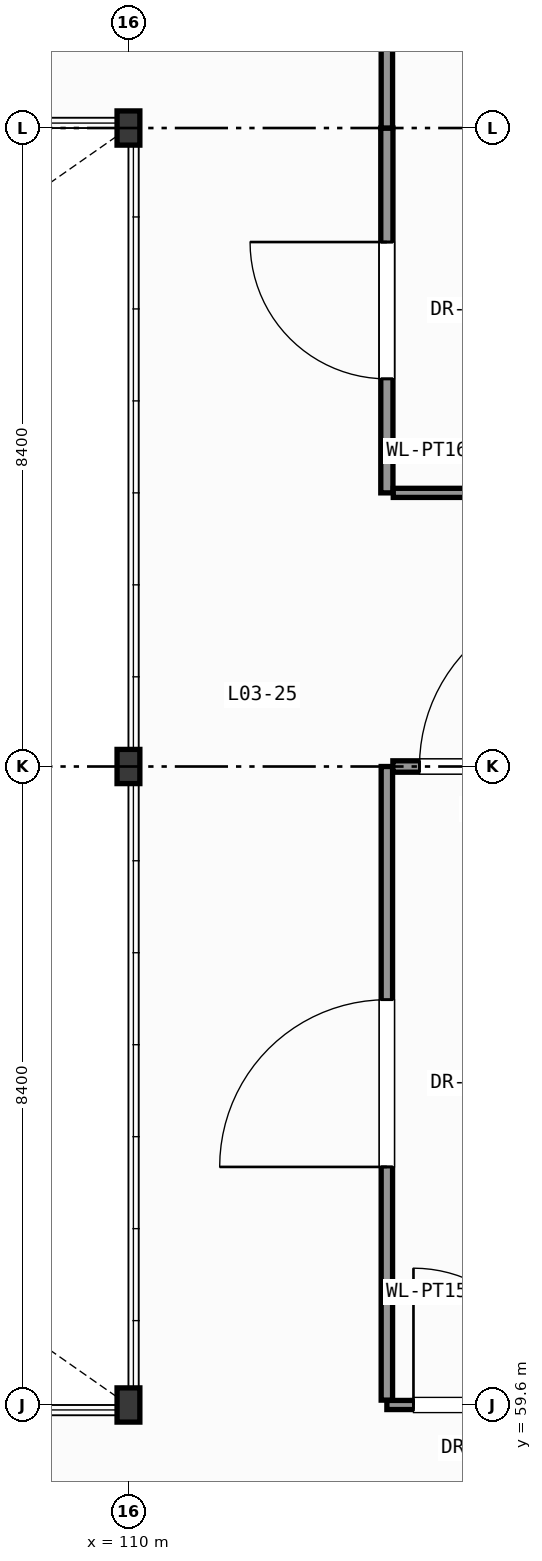
"""IFC4 building model, lengths in metres.
Left out: names, types, materials, properties, quantities, classifications, styles, units other than length and angle.
Written with IfcOpenShell. Run it as: python <this file> out.ifc"""

import sys

from ifc_helpers import new_model, si_unit, direction, frame, frame_2d, origin, origin_2d, place, context, subcontext, project, spatial, rectangle, i_section, extrude, element, fill, save


model = new_model("IFC4")
c1 = context("Model", 3, precision=1e-05, world=origin(), true_north=direction((0.0, 1.0)))
c2 = subcontext(c1, "Body", "Model", "MODEL_VIEW")
j1 = project(units=[si_unit("LENGTHUNIT", "METRE"), si_unit("PLANEANGLEUNIT", "RADIAN")], contexts=[c1])
p1 = place(None, origin())
s1 = spatial("IfcSite", under=j1, at=p1, CompositionType="ELEMENT")
p2 = place(p1, origin())
s2 = spatial("IfcBuilding", under=s1, at=p2, CompositionType="ELEMENT")
p3 = place(p2, frame((0.0, 0.0, 13.2)))
s3 = spatial("IfcBuildingStorey", under=s2, at=p3, CompositionType="ELEMENT", Elevation=13.2)
for number, where, z_axis, x_axis in (
    (1, (110.0, 59.6, 0.0), (0.0, 0.0, 1.0), (1.0, 0.0, 0.0)),
    (2, (110.0, 68.0, 0.0), (0.0, 0.0, 1.0), (1.0, 0.0, 0.0)),
    (3, (110.0, 76.4, 0.0), (0.0, 0.0, 1.0), (1.0, 0.0, 0.0)),
):
    element("IfcColumn", number, at=place(p3, frame(where, z_axis=z_axis, x_axis=x_axis)), inside=s3, PredefinedType="COLUMN", context=c2, shape_type="SweptSolid", body=[
        extrude(i_section(OverallWidth=0.3, OverallDepth=0.45, WebThickness=0.014, FlangeThickness=0.026, FilletRadius=0.027, at=origin_2d()), origin(), (0.0, 0.0, 1.0), 4.8),
    ])
p4 = place(p3, frame((113.4, 59.6, 0.0), z_axis=(0.0, 0.0, 1.0), x_axis=(1.0, 0.0, 0.0)))
e4 = element("IfcWall", 4, at=p4, inside=s3, PredefinedType="PARTITIONING", context=c2, shape_type="SweptSolid", body=[
    extrude(rectangle(XDim=5.2, YDim=0.12, at=frame_2d((2.6, 0.0))), origin(), (0.0, 0.0, 1.0), 4.155),
])
p5 = place(p4, frame((0.35, 0.0, 0.0)))
e5 = element("IfcOpeningElement", 5, at=p5, cuts=e4, PredefinedType="OPENING", context=c2, shape_type="SweptSolid", body=[
    extrude(rectangle(XDim=1.8, YDim=2.4, at=frame_2d((0.9, 1.2))), frame((0.0, 0.07, 0.0), z_axis=(0.0, -1.0, 0.0), x_axis=(1.0, 0.0, 0.0)), (0.0, 0.0, 1.0), 0.14),
])
p6 = place(p3, frame((113.4, 71.6, 0.0), z_axis=(0.0, 0.0, 1.0), x_axis=(0.0, 1.0, 0.0)))
e6 = element("IfcWall", 6, at=p6, inside=s3, PredefinedType="PARTITIONING", context=c2, shape_type="SweptSolid", body=[
    extrude(rectangle(XDim=4.8, YDim=0.16, at=frame_2d((2.4, 0.0))), origin(), (0.0, 0.0, 1.0), 4.56),
])
p7 = place(p6, frame((1.5, 0.0, 0.0)))
e7 = element("IfcOpeningElement", 7, at=p7, cuts=e6, PredefinedType="OPENING", context=c2, shape_type="SweptSolid", body=[
    extrude(rectangle(XDim=1.8, YDim=2.4, at=frame_2d((0.9, 1.2))), frame((0.0, 0.09, 0.0), z_axis=(0.0, -1.0, 0.0), x_axis=(1.0, 0.0, 0.0)), (0.0, 0.0, 1.0), 0.18),
])
p8 = place(p3, frame((113.4, 59.664, 0.0), z_axis=(0.0, 0.0, 1.0), x_axis=(0.0, 1.0, 0.0)))
e8 = element("IfcWall", 8, at=p8, inside=s3, PredefinedType="PARTITIONING", context=c2, shape_type="SweptSolid", body=[
    extrude(rectangle(XDim=8.336, YDim=0.15, at=frame_2d((4.168, 0.0))), origin(), (0.0, 0.0, 1.0), 4.56),
])
p9 = place(p8, frame((3.068, 0.0, 0.0)))
e9 = element("IfcOpeningElement", 9, at=p9, cuts=e8, PredefinedType="OPENING", context=c2, shape_type="SweptSolid", body=[
    extrude(rectangle(XDim=2.2, YDim=2.6, at=frame_2d((1.1, 1.3))), frame((0.0, 0.085, 0.0), z_axis=(0.0, -1.0, 0.0), x_axis=(1.0, 0.0, 0.0)), (0.0, 0.0, 1.0), 0.17),
])
p10 = place(p3, frame((113.4, 76.4, 0.0), z_axis=(0.0, 0.0, 1.0), x_axis=(0.0, 1.0, 0.0)))
e10 = element("IfcWall", 10, at=p10, inside=s3, PredefinedType="PARTITIONING", context=c2, shape_type="SweptSolid", body=[
    extrude(rectangle(XDim=3.336, YDim=0.15, at=frame_2d((1.668, 0.0))), origin(), (0.0, 0.0, 1.0), 4.56),
])
p11 = place(p10, frame((1.168, 0.0, 0.0)))
e11 = element("IfcOpeningElement", 11, at=p11, cuts=e10, PredefinedType="OPENING", context=c2, shape_type="SweptSolid", body=[
    extrude(rectangle(XDim=1.0, YDim=2.15, at=frame_2d((0.5, 1.075))), frame((0.0, 0.085, 0.0), z_axis=(0.0, -1.0, 0.0), x_axis=(1.0, 0.0, 0.0)), (0.0, 0.0, 1.0), 0.17),
])
p12 = place(p3, frame((113.484, 71.6, 0.0), z_axis=(0.0, 0.0, 1.0), x_axis=(1.0, 0.0, 0.0)))
e12 = element("IfcWall", 12, at=p12, inside=s3, PredefinedType="PARTITIONING", context=c2, shape_type="SweptSolid", body=[
    extrude(rectangle(XDim=12.516, YDim=0.12, at=frame_2d((6.258, 0.0))), origin(), (0.0, 0.0, 1.0), 4.56),
])
p13 = place(p12, frame((5.158, 0.0, 0.0)))
e13 = element("IfcOpeningElement", 13, at=p13, cuts=e12, PredefinedType="OPENING", context=c2, shape_type="SweptSolid", body=[
    extrude(rectangle(XDim=2.2, YDim=2.6, at=frame_2d((1.1, 1.3))), frame((0.0, 0.07, 0.0), z_axis=(0.0, -1.0, 0.0), x_axis=(1.0, 0.0, 0.0)), (0.0, 0.0, 1.0), 0.14),
])
p14 = place(p3, frame((113.479, 68.0, 0.0), z_axis=(0.0, 0.0, 1.0), x_axis=(1.0, 0.0, 0.0)))
e14 = element("IfcWall", 14, at=p14, inside=s3, PredefinedType="PARTITIONING", context=c2, shape_type="SweptSolid", body=[
    extrude(rectangle(XDim=12.342, YDim=0.15, at=frame_2d((6.171, 0.0))), origin(), (0.0, 0.0, 1.0), 4.095),
])
p15 = place(p14, frame((0.35, 0.0, 0.0)))
e15 = element("IfcOpeningElement", 15, at=p15, cuts=e14, PredefinedType="OPENING", context=c2, shape_type="SweptSolid", body=[
    extrude(rectangle(XDim=2.2, YDim=2.6, at=frame_2d((1.1, 1.3))), frame((0.0, 0.085, 0.0), z_axis=(0.0, -1.0, 0.0), x_axis=(1.0, 0.0, 0.0)), (0.0, 0.0, 1.0), 0.17),
])
p16 = place(p5, origin())
e16 = element("IfcDoor", 16, at=p16, inside=s3, OperationType="SINGLE_SWING_LEFT", PredefinedType="DOOR", context=c2, shape_type="SweptSolid", body=[
    extrude(rectangle(XDim=1.8, YDim=2.4, at=frame_2d((0.9, 1.2))), frame((0.0, 0.025, 0.0), z_axis=(0.0, -1.0, 0.0), x_axis=(1.0, 0.0, 0.0)), (0.0, 0.0, 1.0), 0.05),
])
fill(e5, e16)
p17 = place(p7, origin())
e17 = element("IfcDoor", 17, at=p17, inside=s3, OperationType="SINGLE_SWING_RIGHT", PredefinedType="DOOR", context=c2, shape_type="SweptSolid", body=[
    extrude(rectangle(XDim=1.8, YDim=2.4, at=frame_2d((0.9, 1.2))), frame((0.0, 0.025, 0.0), z_axis=(0.0, -1.0, 0.0), x_axis=(1.0, 0.0, 0.0)), (0.0, 0.0, 1.0), 0.05),
])
fill(e7, e17)
p18 = place(p9, origin())
e18 = element("IfcDoor", 18, at=p18, inside=s3, OperationType="SINGLE_SWING_LEFT", PredefinedType="DOOR", context=c2, shape_type="SweptSolid", body=[
    extrude(rectangle(XDim=2.2, YDim=2.6, at=frame_2d((1.1, 1.3))), frame((0.0, 0.025, 0.0), z_axis=(0.0, -1.0, 0.0), x_axis=(1.0, 0.0, 0.0)), (0.0, 0.0, 1.0), 0.05),
])
fill(e9, e18)
p19 = place(p15, origin())
e19 = element("IfcDoor", 19, at=p19, inside=s3, OperationType="SINGLE_SWING_RIGHT", PredefinedType="DOOR", context=c2, shape_type="SweptSolid", body=[
    extrude(rectangle(XDim=2.2, YDim=2.6, at=frame_2d((1.1, 1.3))), frame((0.0, 0.025, 0.0), z_axis=(0.0, -1.0, 0.0), x_axis=(1.0, 0.0, 0.0)), (0.0, 0.0, 1.0), 0.05),
])
fill(e15, e19)
save(model, sys.argv[1])
